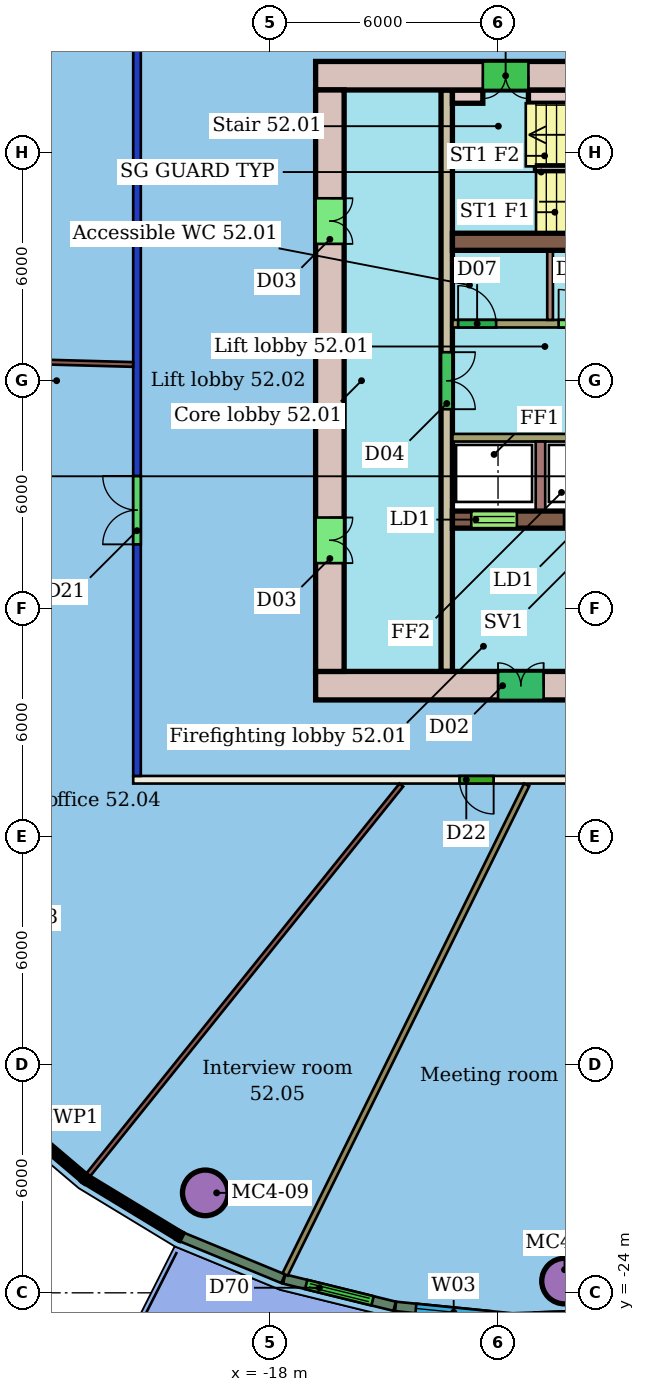
"""IFC4 building model, lengths in metres.
Left out: names, types, materials, properties, quantities, classifications, styles, units other than length and angle.
Written with IfcOpenShell. Run it as: python <this file> out.ifc"""

import sys

from ifc_helpers import new_model, si_unit, direction, frame, frame_2d, origin, origin_2d, place, context, subcontext, project, spatial, rectangle, hollow_circle, extrude, element, fill, save


model = new_model("IFC4")
c1 = context("Model", 3, precision=1e-05, world=origin(), true_north=direction((0.0, 1.0)))
c2 = subcontext(c1, "Body", "Model", "MODEL_VIEW")
j1 = project(units=[si_unit("LENGTHUNIT", "METRE"), si_unit("PLANEANGLEUNIT", "RADIAN")], contexts=[c1])
p1 = place(None, origin())
s1 = spatial("IfcSite", under=j1, at=p1, CompositionType="ELEMENT")
p2 = place(p1, origin())
s2 = spatial("IfcBuilding", under=s1, at=p2, CompositionType="ELEMENT")
p3 = place(p2, frame((0.0, 0.0, 213.7)))
s3 = spatial("IfcBuildingStorey", under=s2, at=p3, CompositionType="ELEMENT", Elevation=213.7)
for number, where, z_axis, x_axis in (
    (1, (-19.704, -21.37, 0.0), (0.0, 0.0, 1.0), (1.0, 0.0, 0.0)),
    (2, (-10.25, -23.691, 0.0), (0.0, 0.0, 1.0), (1.0, 0.0, 0.0)),
):
    element("IfcColumn", number, at=place(p3, frame(where, z_axis=z_axis, x_axis=x_axis)), inside=s3, PredefinedType="COLUMN", context=c2, shape_type="SweptSolid", body=[
        extrude(hollow_circle(Radius=0.6, WallThickness=0.045, at=origin_2d()), origin(), (0.0, 0.0, 1.0), 3.45),
    ])
p4 = place(p3, frame((9.6, -10.5, 0.0), z_axis=(0.0, 0.0, 1.0), x_axis=(-1.0, 0.0, 0.0)))
e3 = element("IfcWall", 3, at=p4, inside=s3, PredefinedType="PARTITIONING", context=c2, shape_type="SweptSolid", body=[
    extrude(rectangle(XDim=31.2, YDim=0.2, at=frame_2d((15.6, 0.0))), origin(), (0.0, 0.0, 1.0), 3.45),
])
p5 = place(p4, frame((21.715, 0.0, 0.0)))
e4 = element("IfcOpeningElement", 4, at=p5, cuts=e3, PredefinedType="OPENING", context=c2, shape_type="SweptSolid", body=[
    extrude(rectangle(XDim=0.9, YDim=2.1, at=frame_2d((0.45, 1.05))), frame((0.0, 0.11, 0.0), z_axis=(0.0, -1.0, 0.0), x_axis=(1.0, 0.0, 0.0)), (0.0, 0.0, 1.0), 0.22),
])
p6 = place(p4, frame((18.751, 0.0, 0.0)))
e5 = element("IfcOpeningElement", 5, at=p6, cuts=e3, PredefinedType="OPENING", context=c2, shape_type="SweptSolid", body=[
    extrude(rectangle(XDim=0.9, YDim=2.1, at=frame_2d((0.45, 1.05))), frame((0.0, 0.11, 0.0), z_axis=(0.0, -1.0, 0.0), x_axis=(1.0, 0.0, 0.0)), (0.0, 0.0, 1.0), 0.22),
])
p7 = place(p4, frame((8.129, 0.0, 0.0)))
e6 = element("IfcOpeningElement", 6, at=p7, cuts=e3, PredefinedType="OPENING", context=c2, shape_type="SweptSolid", body=[
    extrude(rectangle(XDim=1.8, YDim=2.4, at=frame_2d((0.9, 1.2))), frame((0.0, 0.11, 0.0), z_axis=(0.0, -1.0, 0.0), x_axis=(1.0, 0.0, 0.0)), (0.0, 0.0, 1.0), 0.22),
])
p8 = place(p3, frame((-21.5, -10.4, 0.0), z_axis=(0.0, 0.0, 1.0), x_axis=(0.0, 1.0, 0.0)))
e7 = element("IfcWall", 7, at=p8, inside=s3, PredefinedType="PARTITIONING", context=c2, shape_type="SweptSolid", body=[
    extrude(rectangle(XDim=20.8, YDim=0.2, at=frame_2d((10.4, 0.0))), origin(), (0.0, 0.0, 1.0), 3.05),
])
p9 = place(p8, frame((6.094, 0.0, 0.0)))
e8 = element("IfcOpeningElement", 8, at=p9, cuts=e7, PredefinedType="OPENING", context=c2, shape_type="SweptSolid", body=[
    extrude(rectangle(XDim=1.8, YDim=2.1, at=frame_2d((0.9, 1.05))), frame((0.0, 0.11, 0.0), z_axis=(0.0, -1.0, 0.0), x_axis=(1.0, 0.0, 0.0)), (0.0, 0.0, 1.0), 0.22),
])
p10 = place(p3, frame((-29.895, 0.654, 0.0), z_axis=(0.0, 0.0, 1.0), x_axis=(0.999626262379, -0.02733743885, 0.0)))
e9 = element("IfcWall", 9, at=p10, inside=s3, PredefinedType="PARTITIONING", context=c2, shape_type="SweptSolid", body=[
    extrude(rectangle(XDim=8.297, YDim=0.125, at=frame_2d((4.148, 0.0))), origin(), (0.0, 0.0, 1.0), 3.45),
])
p11 = place(p3, frame((-22.786, -20.9, 0.0), z_axis=(0.0, 0.0, 1.0), x_axis=(0.626186985821, 0.779672917824, 0.0)))
e10 = element("IfcWall", 10, at=p11, inside=s3, PredefinedType="PARTITIONING", context=c2, shape_type="SweptSolid", body=[
    extrude(rectangle(XDim=13.161, YDim=0.125, at=frame_2d((6.581, 0.0))), origin(), (0.0, 0.0, 1.0), 3.45),
])
p12 = place(p3, frame((-17.603, -23.515, 0.0), z_axis=(0.0, 0.0, 1.0), x_axis=(0.442482556449, 0.896777111237, 0.0)))
e11 = element("IfcWall", 11, at=p12, inside=s3, PredefinedType="PARTITIONING", context=c2, shape_type="SweptSolid", body=[
    extrude(rectangle(XDim=14.365, YDim=0.15, at=frame_2d((7.182, 0.0))), origin(), (0.0, 0.0, 1.0), 3.45),
])
p13 = place(p3, frame((-20.323, -22.53, 0.0), z_axis=(0.0, 0.0, 1.0), x_axis=(0.924690360412, -0.380720024901, 0.0)))
e12 = element("IfcWall", 12, at=p13, inside=s3, PredefinedType="SOLIDWALL", context=c2, shape_type="SweptSolid", body=[
    extrude(rectangle(XDim=2.886, YDim=0.25, at=frame_2d((1.443, 0.0))), origin(), (0.0, 0.0, 1.0), 3.1),
])
p14 = place(p3, frame((-17.628, -23.637, 0.0), z_axis=(0.0, 0.0, 1.0), x_axis=(0.9709618668, -0.239234306113, 0.0)))
e13 = element("IfcWall", 13, at=p14, inside=s3, PredefinedType="SOLIDWALL", context=c2, shape_type="SweptSolid", body=[
    extrude(rectangle(XDim=2.994, YDim=0.25, at=frame_2d((1.497, 0.0))), origin(), (0.0, 0.0, 1.0), 3.1),
])
p15 = place(p14, frame((0.597, 0.0, 0.0)))
e14 = element("IfcOpeningElement", 14, at=p15, cuts=e13, PredefinedType="OPENING", context=c2, shape_type="SweptSolid", body=[
    extrude(rectangle(XDim=1.8, YDim=2.4, at=frame_2d((0.9, 1.2))), frame((0.0, 0.135, 0.0), z_axis=(0.0, -1.0, 0.0), x_axis=(1.0, 0.0, 0.0)), (0.0, 0.0, 1.0), 0.27),
])
p16 = place(p3, frame((-14.696, -24.358, 0.0), z_axis=(0.0, 0.0, 1.0), x_axis=(0.995081139356, -0.099063242917, 0.0)))
e15 = element("IfcWall", 15, at=p16, inside=s3, PredefinedType="SOLIDWALL", context=c2, shape_type="SweptSolid", body=[
    extrude(rectangle(XDim=3.073, YDim=0.25, at=frame_2d((1.537, 0.0))), origin(), (0.0, 0.0, 1.0), 3.1),
])
p17 = place(p16, frame((0.537, 0.0, 0.9)))
e16 = element("IfcOpeningElement", 16, at=p17, cuts=e15, PredefinedType="OPENING", context=c2, shape_type="SweptSolid", body=[
    extrude(rectangle(XDim=2.0, YDim=2.1, at=frame_2d((1.0, 1.05))), frame((0.0, 0.135, 0.0), z_axis=(0.0, -1.0, 0.0), x_axis=(1.0, 0.0, 0.0)), (0.0, 0.0, 1.0), 0.27),
])
p18 = place(p3, frame((-11.613, -24.663, 0.0), z_axis=(0.0, 0.0, 1.0), x_axis=(0.999351383862, 0.036011270096, 0.0)))
e17 = element("IfcWall", 17, at=p18, inside=s3, PredefinedType="SOLIDWALL", context=c2, shape_type="SweptSolid", body=[
    extrude(rectangle(XDim=3.159, YDim=0.25, at=frame_2d((1.58, 0.0))), origin(), (0.0, 0.0, 1.0), 3.1),
])
p19 = place(p18, frame((0.58, 0.0, 0.9)))
e18 = element("IfcOpeningElement", 18, at=p19, cuts=e17, PredefinedType="OPENING", context=c2, shape_type="SweptSolid", body=[
    extrude(rectangle(XDim=2.0, YDim=2.1, at=frame_2d((1.0, 1.05))), frame((0.0, 0.135, 0.0), z_axis=(0.0, -1.0, 0.0), x_axis=(1.0, 0.0, 0.0)), (0.0, 0.0, 1.0), 0.27),
])
p20 = place(p3, frame((-6.0, 8.025, 0.0), z_axis=(0.0, 0.0, 1.0), x_axis=(-1.0, 0.0, 0.0)))
e19 = element("IfcWall", 19, at=p20, inside=s3, PredefinedType="SHEAR", context=c2, shape_type="SweptSolid", body=[
    extrude(rectangle(XDim=10.8, YDim=0.75, at=frame_2d((5.4, 0.0))), origin(), (0.0, 0.0, 1.0), 3.3),
])
p21 = place(p20, frame((5.2, 0.0, 0.0)))
e20 = element("IfcOpeningElement", 20, at=p21, cuts=e19, PredefinedType="OPENING", context=c2, shape_type="SweptSolid", body=[
    extrude(rectangle(XDim=1.2, YDim=2.1, at=frame_2d((0.6, 1.05))), frame((0.0, 0.385, 0.0), z_axis=(0.0, -1.0, 0.0), x_axis=(1.0, 0.0, 0.0)), (0.0, 0.0, 1.0), 0.77),
])
p22 = place(p3, frame((-16.8, -8.025, 0.0), z_axis=(0.0, 0.0, 1.0), x_axis=(1.0, 0.0, 0.0)))
e21 = element("IfcWall", 21, at=p22, inside=s3, PredefinedType="SHEAR", context=c2, shape_type="SweptSolid", body=[
    extrude(rectangle(XDim=21.6, YDim=0.75, at=frame_2d((10.8, 0.0))), origin(), (0.0, 0.0, 1.0), 3.3),
])
p23 = place(p22, frame((4.8, 0.0, 0.0)))
e22 = element("IfcOpeningElement", 22, at=p23, cuts=e21, PredefinedType="OPENING", context=c2, shape_type="SweptSolid", body=[
    extrude(rectangle(XDim=1.2, YDim=2.1, at=frame_2d((0.6, 1.05))), frame((0.0, 0.385, 0.0), z_axis=(0.0, -1.0, 0.0), x_axis=(1.0, 0.0, 0.0)), (0.0, 0.0, 1.0), 0.77),
])
p24 = place(p3, frame((-16.425, 7.65, 0.0), z_axis=(0.0, 0.0, 1.0), x_axis=(0.0, -1.0, 0.0)))
e23 = element("IfcWall", 23, at=p24, inside=s3, PredefinedType="SHEAR", context=c2, shape_type="SweptSolid", body=[
    extrude(rectangle(XDim=15.3, YDim=0.75, at=frame_2d((7.65, 0.0))), origin(), (0.0, 0.0, 1.0), 3.3),
])
p25 = place(p24, frame((11.25, 0.0, 0.0)))
e24 = element("IfcOpeningElement", 24, at=p25, cuts=e23, PredefinedType="OPENING", context=c2, shape_type="SweptSolid", body=[
    extrude(rectangle(XDim=1.2, YDim=2.1, at=frame_2d((0.6, 1.05))), frame((0.0, 0.385, 0.0), z_axis=(0.0, -1.0, 0.0), x_axis=(1.0, 0.0, 0.0)), (0.0, 0.0, 1.0), 0.77),
])
p26 = place(p24, frame((2.85, 0.0, 0.0)))
e25 = element("IfcOpeningElement", 25, at=p26, cuts=e23, PredefinedType="OPENING", context=c2, shape_type="SweptSolid", body=[
    extrude(rectangle(XDim=1.2, YDim=2.1, at=frame_2d((0.6, 1.05))), frame((0.0, 0.385, 0.0), z_axis=(0.0, -1.0, 0.0), x_axis=(1.0, 0.0, 0.0)), (0.0, 0.0, 1.0), 0.77),
])
p27 = place(p3, frame((-13.2, 3.655, 0.0), z_axis=(0.0, 0.0, 1.0), x_axis=(1.0, 0.0, 0.0)))
e26 = element("IfcWall", 26, at=p27, inside=s3, PredefinedType="SHEAR", context=c2, shape_type="SweptSolid", body=[
    extrude(rectangle(XDim=7.2, YDim=0.45, at=frame_2d((3.6, 0.0))), origin(), (0.0, 0.0, 1.0), 3.3),
])
p28 = place(p3, frame((-13.2, -3.655, 0.0), z_axis=(0.0, 0.0, 1.0), x_axis=(1.0, 0.0, 0.0)))
e27 = element("IfcWall", 27, at=p28, inside=s3, PredefinedType="SHEAR", context=c2, shape_type="SweptSolid", body=[
    extrude(rectangle(XDim=7.2, YDim=0.45, at=frame_2d((3.6, 0.0))), origin(), (0.0, 0.0, 1.0), 3.3),
])
p29 = place(p28, frame((0.496, 0.0, 0.0)))
e28 = element("IfcOpeningElement", 28, at=p29, cuts=e27, PredefinedType="OPENING", context=c2, shape_type="SweptSolid", body=[
    extrude(rectangle(XDim=1.2, YDim=2.1, at=frame_2d((0.6, 1.05))), frame((0.0, 0.235, 0.0), z_axis=(0.0, -1.0, 0.0), x_axis=(1.0, 0.0, 0.0)), (0.0, 0.0, 1.0), 0.47),
])
p30 = place(p28, frame((2.938, 0.0, 0.0)))
e29 = element("IfcOpeningElement", 29, at=p30, cuts=e27, PredefinedType="OPENING", context=c2, shape_type="SweptSolid", body=[
    extrude(rectangle(XDim=1.2, YDim=2.1, at=frame_2d((0.6, 1.05))), frame((0.0, 0.235, 0.0), z_axis=(0.0, -1.0, 0.0), x_axis=(1.0, 0.0, 0.0)), (0.0, 0.0, 1.0), 0.47),
])
p31 = place(p3, frame((-13.35, 7.65, 0.0), z_axis=(0.0, 0.0, 1.0), x_axis=(0.0, -1.0, 0.0)))
e30 = element("IfcWall", 30, at=p31, inside=s3, PredefinedType="SHEAR", context=c2, shape_type="SweptSolid", body=[
    extrude(rectangle(XDim=15.3, YDim=0.3, at=frame_2d((7.65, 0.0))), origin(), (0.0, 0.0, 1.0), 3.3),
])
p32 = place(p31, frame((6.9, 0.0, 0.0)))
e31 = element("IfcOpeningElement", 31, at=p32, cuts=e30, PredefinedType="OPENING", context=c2, shape_type="SweptSolid", body=[
    extrude(rectangle(XDim=1.5, YDim=2.1, at=frame_2d((0.75, 1.05))), frame((0.0, 0.16, 0.0), z_axis=(0.0, -1.0, 0.0), x_axis=(1.0, 0.0, 0.0)), (0.0, 0.0, 1.0), 0.32),
])
p33 = place(p3, frame((-13.2, 1.5, 0.0), z_axis=(0.0, 0.0, 1.0), x_axis=(1.0, 0.0, 0.0)))
e32 = element("IfcWall", 32, at=p33, inside=s3, PredefinedType="SHEAR", context=c2, shape_type="SweptSolid", body=[
    extrude(rectangle(XDim=14.4, YDim=0.2, at=frame_2d((7.2, 0.0))), origin(), (0.0, 0.0, 1.0), 3.3),
])
p34 = place(p33, frame((10.312, 0.0, 0.0)))
e33 = element("IfcOpeningElement", 33, at=p34, cuts=e32, PredefinedType="OPENING", context=c2, shape_type="SweptSolid", body=[
    extrude(rectangle(XDim=1.1, YDim=2.1, at=frame_2d((0.55, 1.05))), frame((0.0, 0.11, 0.0), z_axis=(0.0, -1.0, 0.0), x_axis=(1.0, 0.0, 0.0)), (0.0, 0.0, 1.0), 0.22),
])
p35 = place(p33, frame((12.754, 0.0, 0.0)))
e34 = element("IfcOpeningElement", 34, at=p35, cuts=e32, PredefinedType="OPENING", context=c2, shape_type="SweptSolid", body=[
    extrude(rectangle(XDim=1.1, YDim=2.1, at=frame_2d((0.55, 1.05))), frame((0.0, 0.11, 0.0), z_axis=(0.0, -1.0, 0.0), x_axis=(1.0, 0.0, 0.0)), (0.0, 0.0, 1.0), 0.22),
])
p36 = place(p33, frame((0.15, 0.0, 0.0)))
e35 = element("IfcOpeningElement", 35, at=p36, cuts=e32, PredefinedType="OPENING", context=c2, shape_type="SweptSolid", body=[
    extrude(rectangle(XDim=1.0, YDim=2.1, at=frame_2d((0.5, 1.05))), frame((0.0, 0.11, 0.0), z_axis=(0.0, -1.0, 0.0), x_axis=(1.0, 0.0, 0.0)), (0.0, 0.0, 1.0), 0.22),
])
p37 = place(p33, frame((2.794, 0.0, 0.0)))
e36 = element("IfcOpeningElement", 36, at=p37, cuts=e32, PredefinedType="OPENING", context=c2, shape_type="SweptSolid", body=[
    extrude(rectangle(XDim=0.9, YDim=2.1, at=frame_2d((0.45, 1.05))), frame((0.0, 0.11, 0.0), z_axis=(0.0, -1.0, 0.0), x_axis=(1.0, 0.0, 0.0)), (0.0, 0.0, 1.0), 0.22),
])
p38 = place(p33, frame((8.467, 0.0, 0.0)))
e37 = element("IfcOpeningElement", 37, at=p38, cuts=e32, PredefinedType="OPENING", context=c2, shape_type="SweptSolid", body=[
    extrude(rectangle(XDim=0.9, YDim=2.1, at=frame_2d((0.45, 1.05))), frame((0.0, 0.11, 0.0), z_axis=(0.0, -1.0, 0.0), x_axis=(1.0, 0.0, 0.0)), (0.0, 0.0, 1.0), 0.22),
])
p39 = place(p3, frame((1.2, -1.5, 0.0), z_axis=(0.0, 0.0, 1.0), x_axis=(-1.0, 0.0, 0.0)))
e38 = element("IfcWall", 38, at=p39, inside=s3, PredefinedType="SHEAR", context=c2, shape_type="SweptSolid", body=[
    extrude(rectangle(XDim=14.4, YDim=0.2, at=frame_2d((7.2, 0.0))), origin(), (0.0, 0.0, 1.0), 3.3),
])
p40 = place(p39, frame((7.821, 0.0, 0.0)))
e39 = element("IfcOpeningElement", 39, at=p40, cuts=e38, PredefinedType="OPENING", context=c2, shape_type="SweptSolid", body=[
    extrude(rectangle(XDim=1.2, YDim=2.1, at=frame_2d((0.6, 1.05))), frame((0.0, 0.11, 0.0), z_axis=(0.0, -1.0, 0.0), x_axis=(1.0, 0.0, 0.0)), (0.0, 0.0, 1.0), 0.22),
])
p41 = place(p39, frame((0.546, 0.0, 0.0)))
e40 = element("IfcOpeningElement", 40, at=p41, cuts=e38, PredefinedType="OPENING", context=c2, shape_type="SweptSolid", body=[
    extrude(rectangle(XDim=1.1, YDim=2.1, at=frame_2d((0.55, 1.05))), frame((0.0, 0.11, 0.0), z_axis=(0.0, -1.0, 0.0), x_axis=(1.0, 0.0, 0.0)), (0.0, 0.0, 1.0), 0.22),
])
p42 = place(p39, frame((4.983, 0.0, 0.0)))
e41 = element("IfcOpeningElement", 41, at=p42, cuts=e38, PredefinedType="OPENING", context=c2, shape_type="SweptSolid", body=[
    extrude(rectangle(XDim=1.0, YDim=2.1, at=frame_2d((0.5, 1.05))), frame((0.0, 0.11, 0.0), z_axis=(0.0, -1.0, 0.0), x_axis=(1.0, 0.0, 0.0)), (0.0, 0.0, 1.0), 0.22),
])
p43 = place(p39, frame((2.592, 0.0, 0.0)))
e42 = element("IfcOpeningElement", 42, at=p43, cuts=e38, PredefinedType="OPENING", context=c2, shape_type="SweptSolid", body=[
    extrude(rectangle(XDim=1.0, YDim=2.1, at=frame_2d((0.5, 1.05))), frame((0.0, 0.11, 0.0), z_axis=(0.0, -1.0, 0.0), x_axis=(1.0, 0.0, 0.0)), (0.0, 0.0, 1.0), 0.22),
])
p44 = place(p3, frame((-13.2, 7.475, 0.0), z_axis=(0.0, 0.0, 1.0), x_axis=(1.0, 0.0, 0.0)))
e43 = element("IfcWall", 43, at=p44, inside=s3, PredefinedType="SHEAR", context=c2, shape_type="SweptSolid", body=[
    extrude(rectangle(XDim=0.8, YDim=0.35, at=frame_2d((0.4, 0.0))), origin(), (0.0, 0.0, 1.0), 3.3),
])
p45 = place(p3, frame((-11.2, 7.475, 0.0), z_axis=(0.0, 0.0, 1.0), x_axis=(1.0, 0.0, 0.0)))
e44 = element("IfcWall", 44, at=p45, inside=s3, PredefinedType="SHEAR", context=c2, shape_type="SweptSolid", body=[
    extrude(rectangle(XDim=5.05, YDim=0.35, at=frame_2d((2.525, 0.0))), origin(), (0.0, 0.0, 1.0), 3.3),
])
p46 = place(p3, frame((-10.631, 1.6, 0.0), z_axis=(0.0, 0.0, 1.0), x_axis=(0.0, 1.0, 0.0)))
e45 = element("IfcWall", 45, at=p46, inside=s3, PredefinedType="PARTITIONING", context=c2, shape_type="SweptSolid", body=[
    extrude(rectangle(XDim=1.83, YDim=0.15, at=frame_2d((0.915, 0.0))), origin(), (0.0, 0.0, 1.0), 3.3),
])
p47 = place(p3, frame((-10.883, -1.6, 0.0), z_axis=(0.0, 0.0, 1.0), x_axis=(0.0, -1.0, 0.0)))
e46 = element("IfcWall", 46, at=p47, inside=s3, PredefinedType="SHEAR", context=c2, shape_type="SweptSolid", body=[
    extrude(rectangle(XDim=1.83, YDim=0.25, at=frame_2d((0.915, 0.0))), origin(), (0.0, 0.0, 1.0), 3.3),
])
p48 = place(p9, origin())
e47 = element("IfcDoor", 47, at=p48, inside=s3, OperationType="DOUBLE_DOOR_SINGLE_SWING", PredefinedType="DOOR", context=c2, shape_type="SweptSolid", body=[
    extrude(rectangle(XDim=1.8, YDim=2.1, at=frame_2d((0.9, 1.05))), frame((0.0, 0.025, 0.0), z_axis=(0.0, -1.0, 0.0), x_axis=(1.0, 0.0, 0.0)), (0.0, 0.0, 1.0), 0.05),
])
fill(e8, e47)
p49 = place(p5, origin())
e48 = element("IfcDoor", 48, at=p49, inside=s3, OperationType="SINGLE_SWING_LEFT", PredefinedType="DOOR", context=c2, shape_type="SweptSolid", body=[
    extrude(rectangle(XDim=0.9, YDim=2.1, at=frame_2d((0.45, 1.05))), frame((0.0, 0.025, 0.0), z_axis=(0.0, -1.0, 0.0), x_axis=(1.0, 0.0, 0.0)), (0.0, 0.0, 1.0), 0.05),
])
fill(e4, e48)
p50 = place(p15, origin())
e49 = element("IfcDoor", 49, at=p50, inside=s3, OperationType="DOUBLE_DOOR_SLIDING", PredefinedType="DOOR", context=c2, shape_type="SweptSolid", body=[
    extrude(rectangle(XDim=1.8, YDim=2.4, at=frame_2d((0.9, 1.2))), frame((0.0, 0.025, 0.0), z_axis=(0.0, -1.0, 0.0), x_axis=(1.0, 0.0, 0.0)), (0.0, 0.0, 1.0), 0.05),
])
fill(e14, e49)
p51 = place(p17, origin())
e50 = element("IfcWindow", 50, at=p51, inside=s3, PartitioningType="SINGLE_PANEL", PredefinedType="WINDOW", context=c2, shape_type="SweptSolid", body=[
    extrude(rectangle(XDim=2.0, YDim=2.1, at=frame_2d((1.0, 1.05))), frame((0.0, 0.03, 0.0), z_axis=(0.0, -1.0, 0.0), x_axis=(1.0, 0.0, 0.0)), (0.0, 0.0, 1.0), 0.06),
])
fill(e16, e50)
p52 = place(p21, origin())
e51 = element("IfcDoor", 51, at=p52, inside=s3, OperationType="DOUBLE_DOOR_SINGLE_SWING", PredefinedType="NOTDEFINED", context=c2, shape_type="SweptSolid", body=[
    extrude(rectangle(XDim=1.2, YDim=2.1, at=frame_2d((0.6, 1.05))), frame((0.0, 0.025, 0.0), z_axis=(0.0, -1.0, 0.0), x_axis=(1.0, 0.0, 0.0)), (0.0, 0.0, 1.0), 0.05),
])
fill(e20, e51)
p53 = place(p23, origin())
e52 = element("IfcDoor", 52, at=p53, inside=s3, OperationType="DOUBLE_DOOR_SINGLE_SWING", PredefinedType="NOTDEFINED", context=c2, shape_type="SweptSolid", body=[
    extrude(rectangle(XDim=1.2, YDim=2.1, at=frame_2d((0.6, 1.05))), frame((0.0, 0.025, 0.0), z_axis=(0.0, -1.0, 0.0), x_axis=(1.0, 0.0, 0.0)), (0.0, 0.0, 1.0), 0.05),
])
fill(e22, e52)
p54 = place(p25, origin())
e53 = element("IfcDoor", 53, at=p54, inside=s3, OperationType="DOUBLE_DOOR_SINGLE_SWING", PredefinedType="NOTDEFINED", context=c2, shape_type="SweptSolid", body=[
    extrude(rectangle(XDim=1.2, YDim=2.1, at=frame_2d((0.6, 1.05))), frame((0.0, 0.025, 0.0), z_axis=(0.0, -1.0, 0.0), x_axis=(1.0, 0.0, 0.0)), (0.0, 0.0, 1.0), 0.05),
])
fill(e24, e53)
p55 = place(p26, origin())
e54 = element("IfcDoor", 54, at=p55, inside=s3, OperationType="DOUBLE_DOOR_SINGLE_SWING", PredefinedType="NOTDEFINED", context=c2, shape_type="SweptSolid", body=[
    extrude(rectangle(XDim=1.2, YDim=2.1, at=frame_2d((0.6, 1.05))), frame((0.0, 0.025, 0.0), z_axis=(0.0, -1.0, 0.0), x_axis=(1.0, 0.0, 0.0)), (0.0, 0.0, 1.0), 0.05),
])
fill(e25, e54)
p56 = place(p29, origin())
e55 = element("IfcDoor", 55, at=p56, inside=s3, OperationType="DOUBLE_DOOR_SLIDING", PredefinedType="NOTDEFINED", context=c2, shape_type="SweptSolid", body=[
    extrude(rectangle(XDim=1.2, YDim=2.1, at=frame_2d((0.6, 1.05))), frame((0.0, 0.025, 0.0), z_axis=(0.0, -1.0, 0.0), x_axis=(1.0, 0.0, 0.0)), (0.0, 0.0, 1.0), 0.05),
])
fill(e28, e55)
p57 = place(p30, origin())
e56 = element("IfcDoor", 56, at=p57, inside=s3, OperationType="DOUBLE_DOOR_SLIDING", PredefinedType="NOTDEFINED", context=c2, shape_type="SweptSolid", body=[
    extrude(rectangle(XDim=1.2, YDim=2.1, at=frame_2d((0.6, 1.05))), frame((0.0, 0.025, 0.0), z_axis=(0.0, -1.0, 0.0), x_axis=(1.0, 0.0, 0.0)), (0.0, 0.0, 1.0), 0.05),
])
fill(e29, e56)
p58 = place(p32, origin())
e57 = element("IfcDoor", 57, at=p58, inside=s3, OperationType="DOUBLE_DOOR_SINGLE_SWING", PredefinedType="NOTDEFINED", context=c2, shape_type="SweptSolid", body=[
    extrude(rectangle(XDim=1.5, YDim=2.1, at=frame_2d((0.75, 1.05))), frame((0.0, 0.025, 0.0), z_axis=(0.0, -1.0, 0.0), x_axis=(1.0, 0.0, 0.0)), (0.0, 0.0, 1.0), 0.05),
])
fill(e31, e57)
p59 = place(p36, origin())
e58 = element("IfcDoor", 58, at=p59, inside=s3, OperationType="SINGLE_SWING_LEFT", PredefinedType="NOTDEFINED", context=c2, shape_type="SweptSolid", body=[
    extrude(rectangle(XDim=1.0, YDim=2.1, at=frame_2d((0.5, 1.05))), frame((0.0, 0.025, 0.0), z_axis=(0.0, -1.0, 0.0), x_axis=(1.0, 0.0, 0.0)), (0.0, 0.0, 1.0), 0.05),
])
fill(e35, e58)
p60 = place(p37, origin())
e59 = element("IfcDoor", 59, at=p60, inside=s3, OperationType="SINGLE_SWING_LEFT", PredefinedType="NOTDEFINED", context=c2, shape_type="SweptSolid", body=[
    extrude(rectangle(XDim=0.9, YDim=2.1, at=frame_2d((0.45, 1.05))), frame((0.0, 0.025, 0.0), z_axis=(0.0, -1.0, 0.0), x_axis=(1.0, 0.0, 0.0)), (0.0, 0.0, 1.0), 0.05),
])
fill(e36, e59)
save(model, sys.argv[1])
